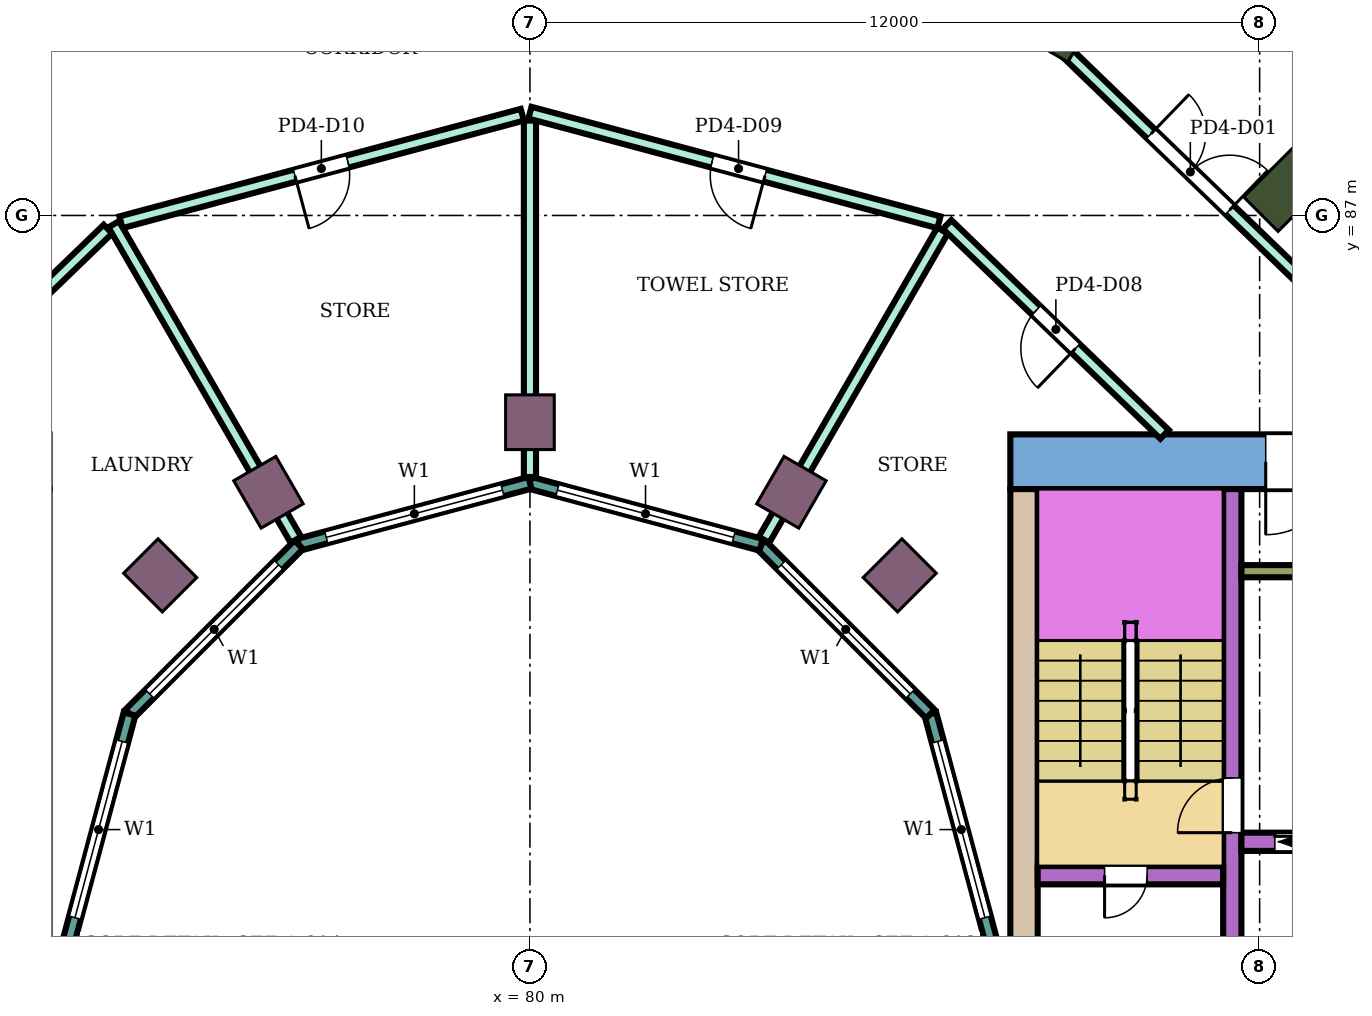
"""IFC4 building model, lengths in metres.
Left out: names, types, materials, properties, quantities, classifications, styles, units other than length and angle.
Written with IfcOpenShell. Run it as: python <this file> out.ifc"""

import sys

from ifc_helpers import new_model, si_unit, direction, frame, frame_2d, origin, origin_2d, place, context, subcontext, project, spatial, rectangle, extrude, element, fill, save


model = new_model("IFC4")
c1 = context("Model", 3, precision=1e-05, world=origin(), true_north=direction((0.0, 1.0)))
c2 = subcontext(c1, "Body", "Model", "MODEL_VIEW")
j1 = project(units=[si_unit("LENGTHUNIT", "METRE"), si_unit("PLANEANGLEUNIT", "RADIAN")], contexts=[c1])
p1 = place(None, origin())
s1 = spatial("IfcSite", under=j1, at=p1, CompositionType="ELEMENT")
p2 = place(p1, origin())
s2 = spatial("IfcBuilding", under=s1, at=p2, CompositionType="ELEMENT")
p3 = place(p2, frame((0.0, 0.0, 23.8)))
s3 = spatial("IfcBuildingStorey", under=s2, at=p3, CompositionType="ELEMENT", Elevation=23.8)
for number, where, z_axis, x_axis in (
    (1, (92.445, 87.445, 0.0), (0.0, 0.0, 1.0), (0.707, 0.707, 0.0)),
    (2, (88.8, 90.242, 0.0), (0.0, 0.0, 1.0), (0.5, 0.866, 0.0)),
):
    element("IfcColumn", number, at=place(p3, frame(where, z_axis=z_axis, x_axis=x_axis)), inside=s3, PredefinedType="COLUMN", context=c2, shape_type="SweptSolid", body=[
        extrude(rectangle(XDim=1.2, YDim=0.8, at=origin_2d()), origin(), (0.0, 0.0, 1.0), 5.0),
    ])
for number, where, z_axis, x_axis in (
    (3, (86.081, 81.081, 0.0), (0.0, 0.0, 1.0), (0.707, 0.707, 0.0)),
    (4, (84.3, 82.448, 0.0), (0.0, 0.0, 1.0), (0.5, 0.866, 0.0)),
    (5, (80.0, 83.6, 0.0), (0.0, 0.0, 1.0), (0.0, 1.0, 0.0)),
    (6, (75.7, 82.448, 0.0), (0.0, 0.0, 1.0), (-0.5, 0.866, 0.0)),
    (7, (73.919, 81.081, 0.0), (0.0, 0.0, 1.0), (-0.707, 0.707, 0.0)),
):
    element("IfcColumn", number, at=place(p3, frame(where, z_axis=z_axis, x_axis=x_axis)), inside=s3, PredefinedType="COLUMN", context=c2, shape_type="SweptSolid", body=[
        extrude(rectangle(XDim=0.9, YDim=0.8, at=origin_2d()), origin(), (0.0, 0.0, 1.0), 5.0),
    ])
p4 = place(p3, frame((87.9, 82.95, 0.0), z_axis=(0.0, 0.0, 1.0), x_axis=(1.0, 0.0, 0.0)))
e8 = element("IfcWall", 8, at=p4, inside=s3, PredefinedType="SHEAR", context=c2, shape_type="SweptSolid", body=[
    extrude(rectangle(XDim=14.6, YDim=0.9, at=frame_2d((7.3, 0.0))), origin(), (0.0, 0.0, 1.0), 4.68),
])
p5 = place(p4, frame((4.2, 0.0, 0.0)))
e9 = element("IfcOpeningElement", 9, at=p5, cuts=e8, PredefinedType="OPENING", context=c2, shape_type="SweptSolid", body=[
    extrude(rectangle(XDim=2.4, YDim=2.4, at=frame_2d((1.2, 1.2))), frame((0.0, 0.46, 0.0), z_axis=(0.0, -1.0, 0.0), x_axis=(1.0, 0.0, 0.0)), (0.0, 0.0, 1.0), 0.92),
])
p6 = place(p3, frame((88.125, 75.0, 0.0), z_axis=(0.0, 0.0, 1.0), x_axis=(0.0, 1.0, 0.0)))
e10 = element("IfcWall", 10, at=p6, inside=s3, PredefinedType="SHEAR", context=c2, shape_type="SweptSolid", body=[
    extrude(rectangle(XDim=7.5, YDim=0.45, at=frame_2d((3.75, 0.0))), origin(), (0.0, 0.0, 1.0), 4.68),
])
p7 = place(p3, frame((91.55, 75.0, 0.0), z_axis=(0.0, 0.0, 1.0), x_axis=(0.0, 1.0, 0.0)))
e11 = element("IfcWall", 11, at=p7, inside=s3, PredefinedType="SHEAR", context=c2, shape_type="SweptSolid", body=[
    extrude(rectangle(XDim=7.5, YDim=0.3, at=frame_2d((3.75, 0.0))), origin(), (0.0, 0.0, 1.0), 4.68),
])
p8 = place(p7, frame((1.85, 0.0, 0.0)))
e12 = element("IfcOpeningElement", 12, at=p8, cuts=e11, PredefinedType="OPENING", context=c2, shape_type="SweptSolid", body=[
    extrude(rectangle(XDim=0.9, YDim=2.1, at=frame_2d((0.45, 1.05))), frame((0.0, 0.16, 0.0), z_axis=(0.0, -1.0, 0.0), x_axis=(1.0, 0.0, 0.0)), (0.0, 0.0, 1.0), 0.32),
])
p9 = place(p3, frame((88.35, 76.15, 0.0), z_axis=(0.0, 0.0, 1.0), x_axis=(1.0, 0.0, 0.0)))
e13 = element("IfcWall", 13, at=p9, inside=s3, PredefinedType="SHEAR", context=c2, shape_type="SweptSolid", body=[
    extrude(rectangle(XDim=3.05, YDim=0.3, at=frame_2d((1.525, 0.0))), origin(), (0.0, 0.0, 1.0), 4.68),
])
p10 = place(p9, frame((1.1, 0.0, 0.0)))
e14 = element("IfcOpeningElement", 14, at=p10, cuts=e13, PredefinedType="OPENING", context=c2, shape_type="SweptSolid", body=[
    extrude(rectangle(XDim=0.7, YDim=2.0, at=frame_2d((0.35, 1.0))), frame((0.0, 0.16, 0.0), z_axis=(0.0, -1.0, 0.0), x_axis=(1.0, 0.0, 0.0)), (0.0, 0.0, 1.0), 0.32),
])
p11 = place(p3, frame((91.7, 76.7, 0.0), z_axis=(0.0, 0.0, 1.0), x_axis=(1.0, 0.0, 0.0)))
e15 = element("IfcWall", 15, at=p11, inside=s3, PredefinedType="SHEAR", context=c2, shape_type="SweptSolid", body=[
    extrude(rectangle(XDim=10.8, YDim=0.3, at=frame_2d((5.4, 0.0))), origin(), (0.0, 0.0, 1.0), 4.68),
])
p12 = place(p11, frame((0.55, 0.0, 0.0)))
e16 = element("IfcOpeningElement", 16, at=p12, cuts=e15, PredefinedType="OPENING", context=c2, shape_type="SweptSolid", body=[
    extrude(rectangle(XDim=1.1, YDim=2.1, at=frame_2d((0.55, 1.05))), frame((0.0, 0.16, 0.0), z_axis=(0.0, -1.0, 0.0), x_axis=(1.0, 0.0, 0.0)), (0.0, 0.0, 1.0), 0.32),
])
p13 = place(p11, frame((8.1, 0.0, 0.0)))
e17 = element("IfcOpeningElement", 17, at=p13, cuts=e15, PredefinedType="OPENING", context=c2, shape_type="SweptSolid", body=[
    extrude(rectangle(XDim=1.0, YDim=2.1, at=frame_2d((0.5, 1.05))), frame((0.0, 0.16, 0.0), z_axis=(0.0, -1.0, 0.0), x_axis=(1.0, 0.0, 0.0)), (0.0, 0.0, 1.0), 0.32),
])
p14 = place(p3, frame((91.7, 81.15, 0.0), z_axis=(0.0, 0.0, 1.0), x_axis=(1.0, 0.0, 0.0)))
e18 = element("IfcWall", 18, at=p14, inside=s3, PredefinedType="SHEAR", context=c2, shape_type="SweptSolid", body=[
    extrude(rectangle(XDim=4.85, YDim=0.2, at=frame_2d((2.425, 0.0))), origin(), (0.0, 0.0, 1.0), 4.68),
])
p15 = place(p3, frame((87.604, 75.0, 0.0), z_axis=(0.0, 0.0, 1.0), x_axis=(-0.258789828301, 0.965933654434, 0.0)))
e19 = element("IfcWall", 19, at=p15, inside=s3, PredefinedType="NOTDEFINED", context=c2, shape_type="SweptSolid", body=[
    extrude(rectangle(XDim=3.936, YDim=0.2, at=frame_2d((1.968, 0.0))), origin(), (0.0, 0.0, 1.0), 5.0),
])
p16 = place(p15, frame((0.468, 0.0, 0.9)))
e20 = element("IfcOpeningElement", 20, at=p16, cuts=e19, PredefinedType="OPENING", context=c2, shape_type="SweptSolid", body=[
    extrude(rectangle(XDim=3.0, YDim=2.3, at=frame_2d((1.5, 1.15))), frame((0.0, 0.11, 0.0), z_axis=(0.0, -1.0, 0.0), x_axis=(1.0, 0.0, 0.0)), (0.0, 0.0, 1.0), 0.22),
])
p17 = place(p3, frame((86.585, 78.802, 0.0), z_axis=(0.0, 0.0, 1.0), x_axis=(-0.707106781187, 0.707106781187, 0.0)))
e21 = element("IfcWall", 21, at=p17, inside=s3, PredefinedType="NOTDEFINED", context=c2, shape_type="SweptSolid", body=[
    extrude(rectangle(XDim=3.936, YDim=0.2, at=frame_2d((1.968, 0.0))), origin(), (0.0, 0.0, 1.0), 5.0),
])
p18 = place(p17, frame((0.468, 0.0, 0.9)))
e22 = element("IfcOpeningElement", 22, at=p18, cuts=e21, PredefinedType="OPENING", context=c2, shape_type="SweptSolid", body=[
    extrude(rectangle(XDim=3.0, YDim=2.3, at=frame_2d((1.5, 1.15))), frame((0.0, 0.11, 0.0), z_axis=(0.0, -1.0, 0.0), x_axis=(1.0, 0.0, 0.0)), (0.0, 0.0, 1.0), 0.22),
])
p19 = place(p3, frame((83.802, 81.585, 0.0), z_axis=(0.0, 0.0, 1.0), x_axis=(-0.965933654434, 0.258789828301, 0.0)))
e23 = element("IfcWall", 23, at=p19, inside=s3, PredefinedType="NOTDEFINED", context=c2, shape_type="SweptSolid", body=[
    extrude(rectangle(XDim=3.936, YDim=0.2, at=frame_2d((1.968, 0.0))), origin(), (0.0, 0.0, 1.0), 5.0),
])
p20 = place(p19, frame((0.468, 0.0, 0.9)))
e24 = element("IfcOpeningElement", 24, at=p20, cuts=e23, PredefinedType="OPENING", context=c2, shape_type="SweptSolid", body=[
    extrude(rectangle(XDim=3.0, YDim=2.3, at=frame_2d((1.5, 1.15))), frame((0.0, 0.11, 0.0), z_axis=(0.0, -1.0, 0.0), x_axis=(1.0, 0.0, 0.0)), (0.0, 0.0, 1.0), 0.22),
])
p21 = place(p3, frame((80.0, 82.604, 0.0), z_axis=(0.0, 0.0, 1.0), x_axis=(-0.965933654434, -0.258789828301, 0.0)))
e25 = element("IfcWall", 25, at=p21, inside=s3, PredefinedType="NOTDEFINED", context=c2, shape_type="SweptSolid", body=[
    extrude(rectangle(XDim=3.936, YDim=0.2, at=frame_2d((1.968, 0.0))), origin(), (0.0, 0.0, 1.0), 5.0),
])
p22 = place(p21, frame((0.468, 0.0, 0.9)))
e26 = element("IfcOpeningElement", 26, at=p22, cuts=e25, PredefinedType="OPENING", context=c2, shape_type="SweptSolid", body=[
    extrude(rectangle(XDim=3.0, YDim=2.3, at=frame_2d((1.5, 1.15))), frame((0.0, 0.11, 0.0), z_axis=(0.0, -1.0, 0.0), x_axis=(1.0, 0.0, 0.0)), (0.0, 0.0, 1.0), 0.22),
])
p23 = place(p3, frame((76.198, 81.585, 0.0), z_axis=(0.0, 0.0, 1.0), x_axis=(-0.707106781187, -0.707106781187, 0.0)))
e27 = element("IfcWall", 27, at=p23, inside=s3, PredefinedType="NOTDEFINED", context=c2, shape_type="SweptSolid", body=[
    extrude(rectangle(XDim=3.936, YDim=0.2, at=frame_2d((1.968, 0.0))), origin(), (0.0, 0.0, 1.0), 5.0),
])
p24 = place(p23, frame((0.468, 0.0, 0.9)))
e28 = element("IfcOpeningElement", 28, at=p24, cuts=e27, PredefinedType="OPENING", context=c2, shape_type="SweptSolid", body=[
    extrude(rectangle(XDim=3.0, YDim=2.3, at=frame_2d((1.5, 1.15))), frame((0.0, 0.11, 0.0), z_axis=(0.0, -1.0, 0.0), x_axis=(1.0, 0.0, 0.0)), (0.0, 0.0, 1.0), 0.22),
])
p25 = place(p3, frame((73.415, 78.802, 0.0), z_axis=(0.0, 0.0, 1.0), x_axis=(-0.258789828301, -0.965933654434, 0.0)))
e29 = element("IfcWall", 29, at=p25, inside=s3, PredefinedType="NOTDEFINED", context=c2, shape_type="SweptSolid", body=[
    extrude(rectangle(XDim=3.936, YDim=0.2, at=frame_2d((1.968, 0.0))), origin(), (0.0, 0.0, 1.0), 5.0),
])
p26 = place(p25, frame((0.468, 0.0, 0.9)))
e30 = element("IfcOpeningElement", 30, at=p26, cuts=e29, PredefinedType="OPENING", context=c2, shape_type="SweptSolid", body=[
    extrude(rectangle(XDim=3.0, YDim=2.3, at=frame_2d((1.5, 1.15))), frame((0.0, 0.11, 0.0), z_axis=(0.0, -1.0, 0.0), x_axis=(1.0, 0.0, 0.0)), (0.0, 0.0, 1.0), 0.22),
])
p27 = place(p3, frame((69.563, 83.4, 0.0), z_axis=(0.0, 0.0, 1.0), x_axis=(0.719454254864, 0.694539829785, 0.0)))
e31 = element("IfcWall", 31, at=p27, inside=s3, PredefinedType="PARTITIONING", context=c2, shape_type="SweptSolid", body=[
    extrude(rectangle(XDim=4.86, YDim=0.2, at=frame_2d((2.43, 0.0))), origin(), (0.0, 0.0, 1.0), 4.55),
])
p28 = place(p27, frame((2.035, 0.0, 0.0)))
e32 = element("IfcOpeningElement", 32, at=p28, cuts=e31, PredefinedType="OPENING", context=c2, shape_type="SweptSolid", body=[
    extrude(rectangle(XDim=0.9, YDim=2.1, at=frame_2d((0.45, 1.05))), frame((0.0, 0.11, 0.0), z_axis=(0.0, -1.0, 0.0), x_axis=(1.0, 0.0, 0.0)), (0.0, 0.0, 1.0), 0.22),
])
p29 = place(p3, frame((73.274, 86.888, 0.0), z_axis=(0.0, 0.0, 1.0), x_axis=(0.965941353683, 0.258761089124, 0.0)))
e33 = element("IfcWall", 33, at=p29, inside=s3, PredefinedType="PARTITIONING", context=c2, shape_type="SweptSolid", body=[
    extrude(rectangle(XDim=6.833, YDim=0.2, at=frame_2d((3.417, 0.0))), origin(), (0.0, 0.0, 1.0), 4.55),
])
p30 = place(p29, frame((2.961, 0.0, 0.0)))
e34 = element("IfcOpeningElement", 34, at=p30, cuts=e33, PredefinedType="OPENING", context=c2, shape_type="SweptSolid", body=[
    extrude(rectangle(XDim=0.9, YDim=2.1, at=frame_2d((0.45, 1.05))), frame((0.0, 0.11, 0.0), z_axis=(0.0, -1.0, 0.0), x_axis=(1.0, 0.0, 0.0)), (0.0, 0.0, 1.0), 0.22),
])
p31 = place(p3, frame((73.155, 86.856, 0.0), z_axis=(0.0, 0.0, 1.0), x_axis=(0.499999919892, -0.866025450035, 0.0)))
e35 = element("IfcWall", 35, at=p31, inside=s3, PredefinedType="PARTITIONING", context=c2, shape_type="SweptSolid", body=[
    extrude(rectangle(XDim=5.992, YDim=0.2, at=frame_2d((2.996, 0.0))), origin(), (0.0, 0.0, 1.0), 4.55),
])
p32 = place(p3, frame((80.0, 82.699, 0.0), z_axis=(0.0, 0.0, 1.0), x_axis=(0.0, 1.0, 0.0)))
e36 = element("IfcWall", 36, at=p32, inside=s3, PredefinedType="PARTITIONING", context=c2, shape_type="SweptSolid", body=[
    extrude(rectangle(XDim=5.861, YDim=0.2, at=frame_2d((2.931, 0.0))), origin(), (0.0, 0.0, 1.0), 4.55),
])
p33 = place(p3, frame((80.0, 88.69, 0.0), z_axis=(0.0, 0.0, 1.0), x_axis=(0.965929896633, -0.258803853893, 0.0)))
e37 = element("IfcWall", 37, at=p33, inside=s3, PredefinedType="PARTITIONING", context=c2, shape_type="SweptSolid", body=[
    extrude(rectangle(XDim=6.963, YDim=0.2, at=frame_2d((3.481, 0.0))), origin(), (0.0, 0.0, 1.0), 4.55),
])
p34 = place(p33, frame((3.102, 0.0, 0.0)))
e38 = element("IfcOpeningElement", 38, at=p34, cuts=e37, PredefinedType="OPENING", context=c2, shape_type="SweptSolid", body=[
    extrude(rectangle(XDim=0.9, YDim=2.1, at=frame_2d((0.45, 1.05))), frame((0.0, 0.11, 0.0), z_axis=(0.0, -1.0, 0.0), x_axis=(1.0, 0.0, 0.0)), (0.0, 0.0, 1.0), 0.22),
])
p35 = place(p3, frame((83.849, 81.667, 0.0), z_axis=(0.0, 0.0, 1.0), x_axis=(0.500029580911, 0.866008324564, 0.0)))
e39 = element("IfcWall", 39, at=p35, inside=s3, PredefinedType="PARTITIONING", context=c2, shape_type="SweptSolid", body=[
    extrude(rectangle(XDim=5.872, YDim=0.2, at=frame_2d((2.936, 0.0))), origin(), (0.0, 0.0, 1.0), 4.55),
])
p36 = place(p3, frame((86.861, 86.852, 0.0), z_axis=(0.0, 0.0, 1.0), x_axis=(0.719448855188, -0.694545423114, 0.0)))
e40 = element("IfcWall", 40, at=p36, inside=s3, PredefinedType="PARTITIONING", context=c2, shape_type="SweptSolid", body=[
    extrude(rectangle(XDim=4.97, YDim=0.2, at=frame_2d((2.485, 0.0))), origin(), (0.0, 0.0, 1.0), 4.55),
])
p37 = place(p36, frame((2.035, 0.0, 0.0)))
e41 = element("IfcOpeningElement", 41, at=p37, cuts=e40, PredefinedType="OPENING", context=c2, shape_type="SweptSolid", body=[
    extrude(rectangle(XDim=0.9, YDim=2.1, at=frame_2d((0.45, 1.05))), frame((0.0, 0.11, 0.0), z_axis=(0.0, -1.0, 0.0), x_axis=(1.0, 0.0, 0.0)), (0.0, 0.0, 1.0), 0.22),
])
p38 = place(p3, frame((88.669, 89.832, 0.0), z_axis=(0.0, 0.0, 1.0), x_axis=(0.719476119958, -0.694517179637, 0.0)))
e42 = element("IfcWall", 42, at=p38, inside=s3, PredefinedType="PARTITIONING", context=c2, shape_type="SweptSolid", body=[
    extrude(rectangle(XDim=7.043, YDim=0.2, at=frame_2d((3.521, 0.0))), origin(), (0.0, 0.0, 1.0), 4.55),
])
p39 = place(p38, frame((2.146, 0.0, 0.0)))
e43 = element("IfcOpeningElement", 43, at=p39, cuts=e42, PredefinedType="OPENING", context=c2, shape_type="SweptSolid", body=[
    extrude(rectangle(XDim=1.8, YDim=2.1, at=frame_2d((0.9, 1.05))), frame((0.0, 0.11, 0.0), z_axis=(0.0, -1.0, 0.0), x_axis=(1.0, 0.0, 0.0)), (0.0, 0.0, 1.0), 0.22),
])
p40 = place(p16, origin())
e44 = element("IfcWindow", 44, at=p40, inside=s3, PartitioningType="SINGLE_PANEL", PredefinedType="WINDOW", context=c2, shape_type="SweptSolid", body=[
    extrude(rectangle(XDim=3.0, YDim=2.3, at=frame_2d((1.5, 1.15))), frame((0.0, 0.03, 0.0), z_axis=(0.0, -1.0, 0.0), x_axis=(1.0, 0.0, 0.0)), (0.0, 0.0, 1.0), 0.06),
])
fill(e20, e44)
p41 = place(p18, origin())
e45 = element("IfcWindow", 45, at=p41, inside=s3, PartitioningType="SINGLE_PANEL", PredefinedType="WINDOW", context=c2, shape_type="SweptSolid", body=[
    extrude(rectangle(XDim=3.0, YDim=2.3, at=frame_2d((1.5, 1.15))), frame((0.0, 0.03, 0.0), z_axis=(0.0, -1.0, 0.0), x_axis=(1.0, 0.0, 0.0)), (0.0, 0.0, 1.0), 0.06),
])
fill(e22, e45)
p42 = place(p20, origin())
e46 = element("IfcWindow", 46, at=p42, inside=s3, PartitioningType="SINGLE_PANEL", PredefinedType="WINDOW", context=c2, shape_type="SweptSolid", body=[
    extrude(rectangle(XDim=3.0, YDim=2.3, at=frame_2d((1.5, 1.15))), frame((0.0, 0.03, 0.0), z_axis=(0.0, -1.0, 0.0), x_axis=(1.0, 0.0, 0.0)), (0.0, 0.0, 1.0), 0.06),
])
fill(e24, e46)
p43 = place(p22, origin())
e47 = element("IfcWindow", 47, at=p43, inside=s3, PartitioningType="SINGLE_PANEL", PredefinedType="WINDOW", context=c2, shape_type="SweptSolid", body=[
    extrude(rectangle(XDim=3.0, YDim=2.3, at=frame_2d((1.5, 1.15))), frame((0.0, 0.03, 0.0), z_axis=(0.0, -1.0, 0.0), x_axis=(1.0, 0.0, 0.0)), (0.0, 0.0, 1.0), 0.06),
])
fill(e26, e47)
p44 = place(p24, origin())
e48 = element("IfcWindow", 48, at=p44, inside=s3, PartitioningType="SINGLE_PANEL", PredefinedType="WINDOW", context=c2, shape_type="SweptSolid", body=[
    extrude(rectangle(XDim=3.0, YDim=2.3, at=frame_2d((1.5, 1.15))), frame((0.0, 0.03, 0.0), z_axis=(0.0, -1.0, 0.0), x_axis=(1.0, 0.0, 0.0)), (0.0, 0.0, 1.0), 0.06),
])
fill(e28, e48)
p45 = place(p26, origin())
e49 = element("IfcWindow", 49, at=p45, inside=s3, PartitioningType="SINGLE_PANEL", PredefinedType="WINDOW", context=c2, shape_type="SweptSolid", body=[
    extrude(rectangle(XDim=3.0, YDim=2.3, at=frame_2d((1.5, 1.15))), frame((0.0, 0.03, 0.0), z_axis=(0.0, -1.0, 0.0), x_axis=(1.0, 0.0, 0.0)), (0.0, 0.0, 1.0), 0.06),
])
fill(e30, e49)
p46 = place(p39, origin())
e50 = element("IfcDoor", 50, at=p46, inside=s3, OperationType="DOUBLE_DOOR_SINGLE_SWING", PredefinedType="DOOR", context=c2, shape_type="SweptSolid", body=[
    extrude(rectangle(XDim=1.8, YDim=2.1, at=frame_2d((0.9, 1.05))), frame((0.0, 0.025, 0.0), z_axis=(0.0, -1.0, 0.0), x_axis=(1.0, 0.0, 0.0)), (0.0, 0.0, 1.0), 0.05),
])
fill(e43, e50)
p47 = place(p37, frame((0.9, 0.0, 0.0), z_axis=(0.0, 0.0, 1.0), x_axis=(-1.0, 0.0, 0.0)))
e51 = element("IfcDoor", 51, at=p47, inside=s3, OperationType="SINGLE_SWING_LEFT", PredefinedType="DOOR", context=c2, shape_type="SweptSolid", body=[
    extrude(rectangle(XDim=0.9, YDim=2.1, at=frame_2d((0.45, 1.05))), frame((0.0, 0.025, 0.0), z_axis=(0.0, -1.0, 0.0), x_axis=(1.0, 0.0, 0.0)), (0.0, 0.0, 1.0), 0.05),
])
fill(e41, e51)
p48 = place(p34, frame((0.9, 0.0, 0.0), z_axis=(0.0, 0.0, 1.0), x_axis=(-1.0, 0.0, 0.0)))
e52 = element("IfcDoor", 52, at=p48, inside=s3, OperationType="SINGLE_SWING_LEFT", PredefinedType="DOOR", context=c2, shape_type="SweptSolid", body=[
    extrude(rectangle(XDim=0.9, YDim=2.1, at=frame_2d((0.45, 1.05))), frame((0.0, 0.025, 0.0), z_axis=(0.0, -1.0, 0.0), x_axis=(1.0, 0.0, 0.0)), (0.0, 0.0, 1.0), 0.05),
])
fill(e38, e52)
p49 = place(p30, frame((0.9, 0.0, 0.0), z_axis=(0.0, 0.0, 1.0), x_axis=(-1.0, 0.0, 0.0)))
e53 = element("IfcDoor", 53, at=p49, inside=s3, OperationType="SINGLE_SWING_RIGHT", PredefinedType="DOOR", context=c2, shape_type="SweptSolid", body=[
    extrude(rectangle(XDim=0.9, YDim=2.1, at=frame_2d((0.45, 1.05))), frame((0.0, 0.025, 0.0), z_axis=(0.0, -1.0, 0.0), x_axis=(1.0, 0.0, 0.0)), (0.0, 0.0, 1.0), 0.05),
])
fill(e34, e53)
p50 = place(p10, frame((0.7, 0.0, 0.0), z_axis=(0.0, 0.0, 1.0), x_axis=(-1.0, 0.0, 0.0)))
e54 = element("IfcDoor", 54, at=p50, inside=s3, OperationType="SINGLE_SWING_RIGHT", PredefinedType="DOOR", context=c2, shape_type="SweptSolid", body=[
    extrude(rectangle(XDim=0.7, YDim=2.0, at=frame_2d((0.35, 1.0))), frame((0.0, 0.025, 0.0), z_axis=(0.0, -1.0, 0.0), x_axis=(1.0, 0.0, 0.0)), (0.0, 0.0, 1.0), 0.05),
])
fill(e14, e54)
p51 = place(p8, origin())
e55 = element("IfcDoor", 55, at=p51, inside=s3, OperationType="SINGLE_SWING_LEFT", PredefinedType="DOOR", context=c2, shape_type="SweptSolid", body=[
    extrude(rectangle(XDim=0.9, YDim=2.1, at=frame_2d((0.45, 1.05))), frame((0.0, 0.025, 0.0), z_axis=(0.0, -1.0, 0.0), x_axis=(1.0, 0.0, 0.0)), (0.0, 0.0, 1.0), 0.05),
])
fill(e12, e55)
p52 = place(p12, origin())
e56 = element("IfcDoor", 56, at=p52, inside=s3, OperationType="DOUBLE_DOOR_SLIDING", PredefinedType="DOOR", context=c2, shape_type="SweptSolid", body=[
    extrude(rectangle(XDim=1.1, YDim=2.1, at=frame_2d((0.55, 1.05))), frame((0.0, 0.025, 0.0), z_axis=(0.0, -1.0, 0.0), x_axis=(1.0, 0.0, 0.0)), (0.0, 0.0, 1.0), 0.05),
])
fill(e16, e56)
p53 = place(p5, frame((2.4, 0.0, 0.0), z_axis=(0.0, 0.0, 1.0), x_axis=(-1.0, 0.0, 0.0)))
e57 = element("IfcDoor", 57, at=p53, inside=s3, OperationType="DOUBLE_DOOR_SINGLE_SWING", PredefinedType="DOOR", context=c2, shape_type="SweptSolid", body=[
    extrude(rectangle(XDim=2.4, YDim=2.4, at=frame_2d((1.2, 1.2))), frame((0.0, 0.025, 0.0), z_axis=(0.0, -1.0, 0.0), x_axis=(1.0, 0.0, 0.0)), (0.0, 0.0, 1.0), 0.05),
])
fill(e9, e57)
save(model, sys.argv[1])
